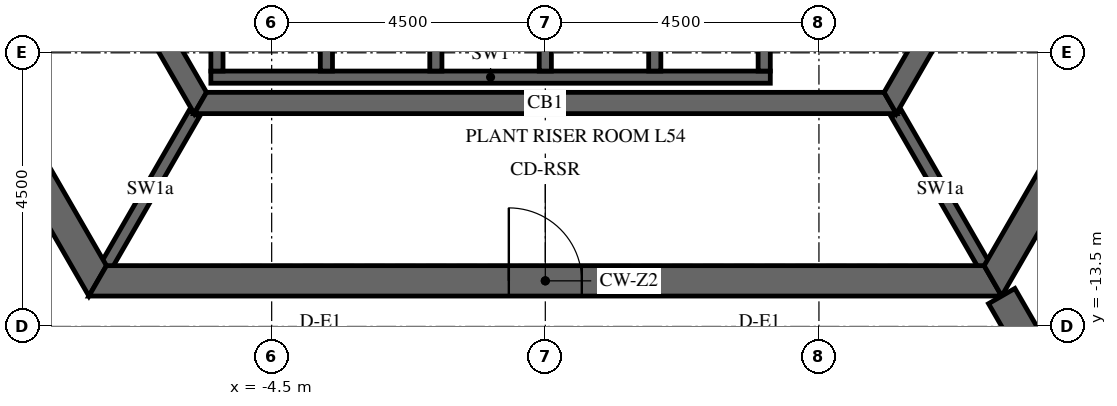
"""IFC4 building model, lengths in metres.
Left out: names, types, materials, properties, quantities, classifications, styles, units other than length and angle.
Written with IfcOpenShell. Run it as: python <this file> out.ifc"""

import sys

from ifc_helpers import new_model, si_unit, direction, frame, frame_2d, origin, place, context, subcontext, project, spatial, polyline, rectangle, outline, extrude, element, fill, save


model = new_model("IFC4")
c1 = context("Model", 3, precision=1e-05, world=origin(), true_north=direction((0.0, 1.0)))
c2 = subcontext(c1, "Body", "Model", "MODEL_VIEW")
j1 = project(units=[si_unit("LENGTHUNIT", "METRE"), si_unit("PLANEANGLEUNIT", "RADIAN")], contexts=[c1])
p1 = place(None, origin())
s1 = spatial("IfcSite", under=j1, at=p1, CompositionType="ELEMENT")
p2 = place(p1, origin())
s2 = spatial("IfcBuilding", under=s1, at=p2, CompositionType="ELEMENT")
p3 = place(p2, frame((0.0, 0.0, 226.8)))
s3 = spatial("IfcBuildingStorey", under=s2, at=p3, CompositionType="ELEMENT", Elevation=226.8)
p4 = place(p3, frame((-14.722, 0.0, -0.15), z_axis=(0.0, 0.0, 1.0), x_axis=(0.50000571537, -0.866022103989, 0.0)))
e1 = element("IfcWall", 1, at=p4, inside=s3, PredefinedType="SHEAR", context=c2, shape_type="SweptSolid", body=[
    extrude(outline(polyline([(-0.144, -0.25), (14.867, -0.25), (14.578, 0.25), (0.144, 0.25), (-0.144, -0.25)])), origin(), (0.0, 0.0, 1.0), 3.9),
])
p5 = place(p4, frame((6.432, 0.0, 0.15)))
e2 = element("IfcOpeningElement", 2, at=p5, cuts=e1, PredefinedType="OPENING", context=c2, shape_type="SweptSolid", body=[
    extrude(rectangle(XDim=1.8, YDim=2.4, at=frame_2d((0.9, 1.2))), frame((0.0, 0.26, 0.0), z_axis=(0.0, -1.0, 0.0), x_axis=(1.0, 0.0, 0.0)), (0.0, 0.0, 1.0), 0.52),
])
p6 = place(p3, frame((-7.361, -12.75, -0.15), z_axis=(0.0, 0.0, 1.0), x_axis=(1.0, 0.0, 0.0)))
e3 = element("IfcWall", 3, at=p6, inside=s3, PredefinedType="SHEAR", context=c2, shape_type="SweptSolid", body=[
    extrude(outline(polyline([(-0.144, -0.25), (14.866, -0.25), (14.578, 0.25), (0.144, 0.25), (-0.144, -0.25)])), origin(), (0.0, 0.0, 1.0), 3.9),
])
p7 = place(p6, frame((6.761, 0.0, 0.15)))
e4 = element("IfcOpeningElement", 4, at=p7, cuts=e3, PredefinedType="OPENING", context=c2, shape_type="SweptSolid", body=[
    extrude(rectangle(XDim=1.2, YDim=2.4, at=frame_2d((0.6, 1.2))), frame((0.0, 0.26, 0.0), z_axis=(0.0, -1.0, 0.0), x_axis=(1.0, 0.0, 0.0)), (0.0, 0.0, 1.0), 0.52),
])
p8 = place(p3, frame((7.361, -12.75, -0.15), z_axis=(0.0, 0.0, 1.0), x_axis=(0.50000571537, 0.866022103989, 0.0)))
e5 = element("IfcWall", 5, at=p8, inside=s3, PredefinedType="SHEAR", context=c2, shape_type="SweptSolid", body=[
    extrude(outline(polyline([(-0.144, -0.25), (14.867, -0.25), (14.578, 0.25), (0.144, 0.25), (-0.144, -0.25)])), origin(), (0.0, 0.0, 1.0), 3.9),
])
p9 = place(p8, frame((6.49, 0.0, 0.15)))
e6 = element("IfcOpeningElement", 6, at=p9, cuts=e5, PredefinedType="OPENING", context=c2, shape_type="SweptSolid", body=[
    extrude(rectangle(XDim=1.8, YDim=2.4, at=frame_2d((0.9, 1.2))), frame((0.0, 0.26, 0.0), z_axis=(0.0, -1.0, 0.0), x_axis=(1.0, 0.0, 0.0)), (0.0, 0.0, 1.0), 0.52),
])
p10 = place(p3, frame((7.506, -13.0, -0.15), z_axis=(0.0, 0.0, 1.0), x_axis=(0.499988271576, -0.866032175087, 0.0)))
e7 = element("IfcWall", 7, at=p10, inside=s3, PredefinedType="SHEAR", context=c2, shape_type="SweptSolid", body=[
    extrude(rectangle(XDim=15.424, YDim=0.5, at=frame_2d((7.712, 0.0))), origin(), (0.0, 0.0, 1.0), 3.9),
])
p11 = place(p10, frame((6.812, 0.0, 0.15)))
e8 = element("IfcOpeningElement", 8, at=p11, cuts=e7, PredefinedType="OPENING", context=c2, shape_type="SweptSolid", body=[
    extrude(rectangle(XDim=1.8, YDim=2.4, at=frame_2d((0.9, 1.2))), frame((0.0, 0.26, 0.0), z_axis=(0.0, -1.0, 0.0), x_axis=(1.0, 0.0, 0.0)), (0.0, 0.0, 1.0), 0.52),
])
p12 = place(p3, frame((-11.345, 0.0, -0.15), z_axis=(0.0, 0.0, 1.0), x_axis=(0.499995046907, -0.866028263435, 0.0)))
e9 = element("IfcWall", 9, at=p12, inside=s3, PredefinedType="SHEAR", context=c2, shape_type="SweptSolid", body=[
    extrude(outline(polyline([(-0.101, -0.175), (11.446, -0.175), (11.244, 0.175), (0.101, 0.175), (-0.101, -0.175)])), origin(), (0.0, 0.0, 1.0), 3.9),
])
p13 = place(p12, frame((4.744, 0.0, 0.15)))
e10 = element("IfcOpeningElement", 10, at=p13, cuts=e9, PredefinedType="OPENING", context=c2, shape_type="SweptSolid", body=[
    extrude(rectangle(XDim=1.8, YDim=2.4, at=frame_2d((0.9, 1.2))), frame((0.0, 0.185, 0.0), z_axis=(0.0, -1.0, 0.0), x_axis=(1.0, 0.0, 0.0)), (0.0, 0.0, 1.0), 0.37),
])
p14 = place(p3, frame((-5.673, -9.825, -0.15), z_axis=(0.0, 0.0, 1.0), x_axis=(1.0, 0.0, 0.0)))
e11 = element("IfcWall", 11, at=p14, inside=s3, PredefinedType="SHEAR", context=c2, shape_type="SweptSolid", body=[
    extrude(outline(polyline([(-0.101, -0.175), (11.446, -0.175), (11.244, 0.175), (0.101, 0.175), (-0.101, -0.175)])), origin(), (0.0, 0.0, 1.0), 3.9),
])
p15 = place(p3, frame((5.673, -9.825, -0.15), z_axis=(0.0, 0.0, 1.0), x_axis=(0.499995046907, 0.866028263435, 0.0)))
e12 = element("IfcWall", 12, at=p15, inside=s3, PredefinedType="SHEAR", context=c2, shape_type="SweptSolid", body=[
    extrude(outline(polyline([(-0.101, -0.175), (11.446, -0.175), (11.244, 0.175), (0.101, 0.175), (-0.101, -0.175)])), origin(), (0.0, 0.0, 1.0), 3.9),
])
p16 = place(p15, frame((4.801, 0.0, 0.15)))
e13 = element("IfcOpeningElement", 13, at=p16, cuts=e12, PredefinedType="OPENING", context=c2, shape_type="SweptSolid", body=[
    extrude(rectangle(XDim=1.8, YDim=2.4, at=frame_2d((0.9, 1.2))), frame((0.0, 0.185, 0.0), z_axis=(0.0, -1.0, 0.0), x_axis=(1.0, 0.0, 0.0)), (0.0, 0.0, 1.0), 0.37),
])
p17 = place(p3, frame((-5.5, -9.4, -0.25), z_axis=(0.0, 0.0, 1.0), x_axis=(1.0, 0.0, 0.0)))
e14 = element("IfcWall", 14, at=p17, inside=s3, PredefinedType="SHEAR", context=c2, shape_type="SweptSolid", body=[
    extrude(rectangle(XDim=9.2, YDim=0.2, at=frame_2d((4.6, 0.0))), origin(), (0.0, 0.0, 1.0), 3.9),
])
for number, where, z_axis, x_axis in (
    (15, (-5.4, -9.3, -0.25), (0.0, 0.0, 1.0), (0.0, 1.0, 0.0)),
    (16, (-3.6, -9.3, -0.25), (0.0, 0.0, 1.0), (0.0, 1.0, 0.0)),
    (17, (-1.8, -9.3, -0.25), (0.0, 0.0, 1.0), (0.0, 1.0, 0.0)),
    (18, (0.0, -9.3, -0.25), (0.0, 0.0, 1.0), (0.0, 1.0, 0.0)),
    (19, (1.8, -9.3, -0.25), (0.0, 0.0, 1.0), (0.0, 1.0, 0.0)),
    (20, (3.6, -9.3, -0.25), (0.0, 0.0, 1.0), (0.0, 1.0, 0.0)),
):
    element("IfcWall", number, at=place(p3, frame(where, z_axis=z_axis, x_axis=x_axis)), inside=s3, PredefinedType="SHEAR", context=c2, shape_type="SweptSolid", body=[
        extrude(rectangle(XDim=2.9, YDim=0.2, at=frame_2d((1.45, 0.0))), origin(), (0.0, 0.0, 1.0), 3.9),
    ])
for number, where, z_axis, x_axis in (
    (21, (-5.773, -10.0, -0.15), (0.0, 0.0, 1.0), (-0.5, -0.866, 0.0)),
    (22, (5.773, -10.0, -0.15), (0.0, 0.0, 1.0), (0.5, -0.866, 0.0)),
):
    element("IfcWall", number, at=place(p3, frame(where, z_axis=z_axis, x_axis=x_axis)), inside=s3, PredefinedType="SHEAR", context=c2, shape_type="SweptSolid", body=[
        extrude(rectangle(XDim=2.887, YDim=0.2, at=frame_2d((1.443, 0.0))), origin(), (0.0, 0.0, 1.0), 3.9),
    ])
p18 = place(p7, origin())
e23 = element("IfcDoor", 23, at=p18, inside=s3, OperationType="SINGLE_SWING_LEFT", PredefinedType="DOOR", context=c2, shape_type="SweptSolid", body=[
    extrude(rectangle(XDim=1.2, YDim=2.4, at=frame_2d((0.6, 1.2))), frame((0.0, 0.025, 0.0), z_axis=(0.0, -1.0, 0.0), x_axis=(1.0, 0.0, 0.0)), (0.0, 0.0, 1.0), 0.05),
])
fill(e4, e23)
save(model, sys.argv[1])
